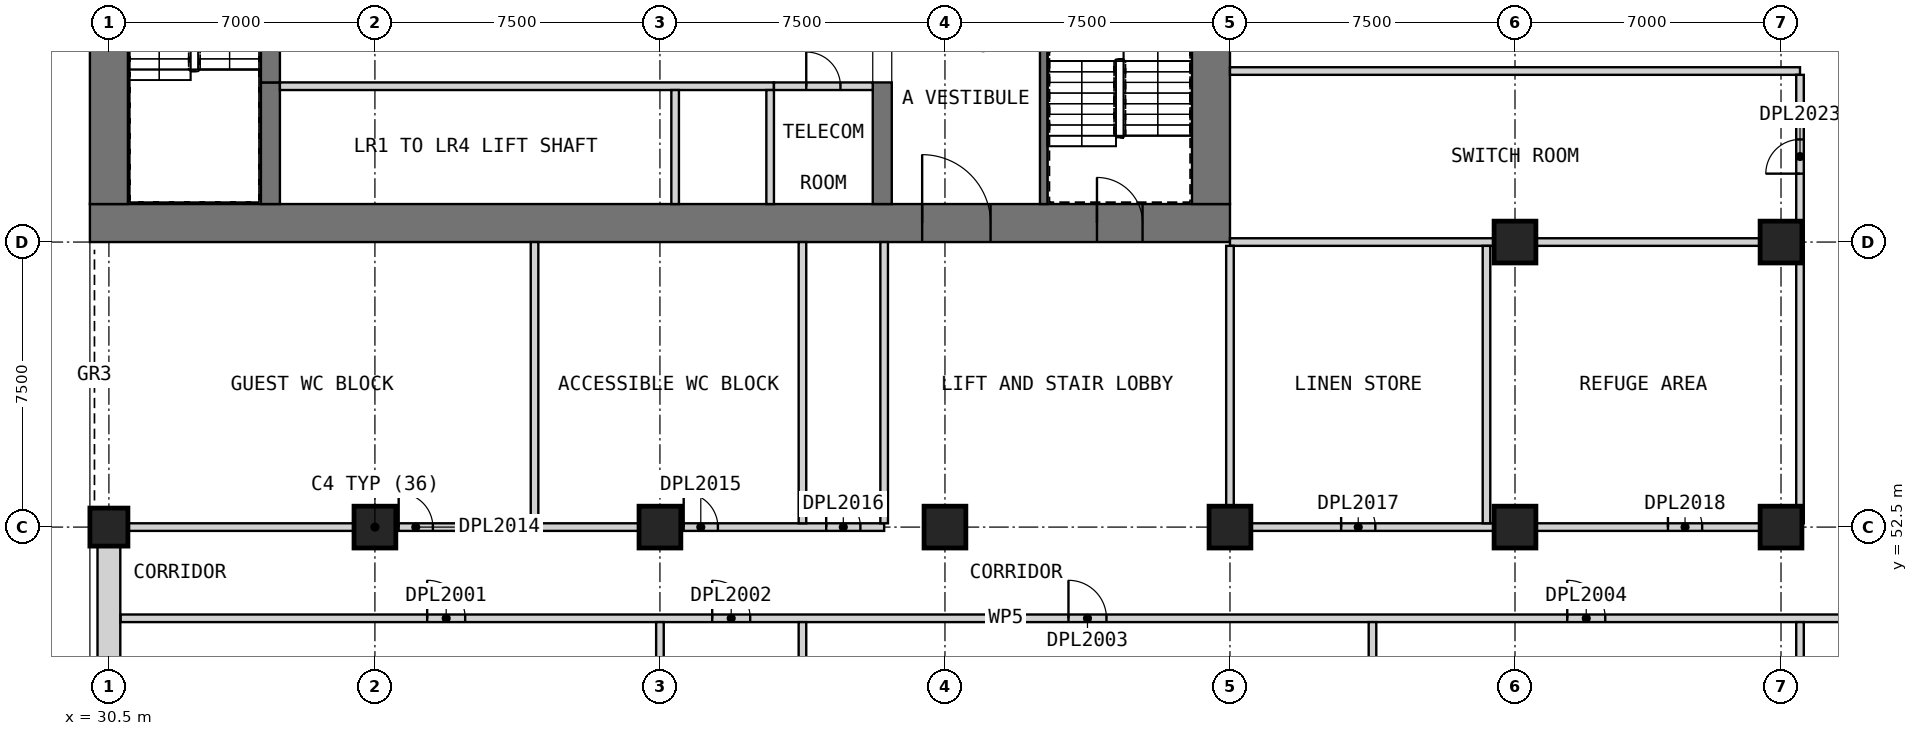
"""IFC4 building model, lengths in metres.
Left out: names, types, materials, properties, quantities, classifications, styles, units other than length and angle.
Written with IfcOpenShell. Run it as: python <this file> out.ifc"""

import sys

from ifc_helpers import new_model, si_unit, direction, frame, frame_2d, origin, origin_2d, place, context, subcontext, project, spatial, rectangle, extrude, element, fill, save


model = new_model("IFC4")
c1 = context("Model", 3, precision=1e-05, world=origin(), true_north=direction((0.0, 1.0)))
c2 = subcontext(c1, "Body", "Model", "MODEL_VIEW")
j1 = project(units=[si_unit("LENGTHUNIT", "METRE"), si_unit("PLANEANGLEUNIT", "RADIAN")], contexts=[c1])
p1 = place(None, origin())
s1 = spatial("IfcSite", under=j1, at=p1, CompositionType="ELEMENT")
p2 = place(p1, origin())
s2 = spatial("IfcBuilding", under=s1, at=p2, CompositionType="ELEMENT")
p3 = place(p2, frame((0.0, 0.0, 118.7)))
s3 = spatial("IfcBuildingStorey", under=s2, at=p3, CompositionType="ELEMENT", Elevation=118.7)
p4 = place(p3, frame((30.5, 52.5, 0.0), z_axis=(0.0, 0.0, 1.0), x_axis=(1.0, 0.0, 0.0)))
e1 = element("IfcColumn", 1, at=p4, inside=s3, PredefinedType="COLUMN", context=c2, shape_type="SweptSolid", body=[
    extrude(rectangle(XDim=1.0, YDim=1.0, at=origin_2d()), origin(), (0.0, 0.0, 1.0), 5.5),
])
for number, where, z_axis, x_axis in (
    (2, (37.5, 52.5, 0.0), (0.0, 0.0, 1.0), (1.0, 0.0, 0.0)),
    (3, (45.0, 52.5, 0.0), (0.0, 0.0, 1.0), (1.0, 0.0, 0.0)),
    (4, (52.5, 52.5, 0.0), (0.0, 0.0, 1.0), (1.0, 0.0, 0.0)),
    (5, (60.0, 52.5, 0.0), (0.0, 0.0, 1.0), (1.0, 0.0, 0.0)),
    (6, (67.5, 52.5, 0.0), (0.0, 0.0, 1.0), (1.0, 0.0, 0.0)),
    (7, (67.5, 60.0, 0.0), (0.0, 0.0, 1.0), (1.0, 0.0, 0.0)),
    (8, (74.5, 52.5, 0.0), (0.0, 0.0, 1.0), (1.0, 0.0, 0.0)),
    (9, (74.5, 60.0, 0.0), (0.0, 0.0, 1.0), (1.0, 0.0, 0.0)),
):
    element("IfcColumn", number, at=place(p3, frame(where, z_axis=z_axis, x_axis=x_axis)), inside=s3, PredefinedType="COLUMN", context=c2, shape_type="SweptSolid", body=[
        extrude(rectangle(XDim=1.1, YDim=1.1, at=origin_2d()), origin(), (0.0, 0.0, 1.0), 5.5),
    ])
p5 = place(p3, frame((30.0, 60.5, 0.0), z_axis=(0.0, 0.0, 1.0), x_axis=(1.0, 0.0, 0.0)))
e10 = element("IfcWall", 10, at=p5, inside=s3, PredefinedType="SHEAR", context=c2, shape_type="SweptSolid", body=[
    extrude(rectangle(XDim=30.0, YDim=1.0, at=frame_2d((15.0, 0.0))), origin(), (0.0, 0.0, 1.0), 5.5),
])
p6 = place(p5, frame((21.9, 0.0, 0.0)))
e11 = element("IfcOpeningElement", 11, at=p6, cuts=e10, PredefinedType="OPENING", context=c2, shape_type="SweptSolid", body=[
    extrude(rectangle(XDim=1.8, YDim=2.1, at=frame_2d((0.9, 1.05))), frame((0.0, 0.51, 0.0), z_axis=(0.0, -1.0, 0.0), x_axis=(1.0, 0.0, 0.0)), (0.0, 0.0, 1.0), 1.02),
])
p7 = place(p5, frame((26.5, 0.0, 0.0)))
e12 = element("IfcOpeningElement", 12, at=p7, cuts=e10, PredefinedType="OPENING", context=c2, shape_type="SweptSolid", body=[
    extrude(rectangle(XDim=1.2, YDim=2.1, at=frame_2d((0.6, 1.05))), frame((0.0, 0.51, 0.0), z_axis=(0.0, -1.0, 0.0), x_axis=(1.0, 0.0, 0.0)), (0.0, 0.0, 1.0), 1.02),
])
p8 = place(p3, frame((30.5, 61.0, 0.0), z_axis=(0.0, 0.0, 1.0), x_axis=(0.0, 1.0, 0.0)))
e13 = element("IfcWall", 13, at=p8, inside=s3, PredefinedType="SHEAR", context=c2, shape_type="SweptSolid", body=[
    extrude(rectangle(XDim=20.5, YDim=1.0, at=frame_2d((10.25, 0.0))), origin(), (0.0, 0.0, 1.0), 5.5),
])
p9 = place(p3, frame((59.5, 61.0, 0.0), z_axis=(0.0, 0.0, 1.0), x_axis=(0.0, 1.0, 0.0)))
e14 = element("IfcWall", 14, at=p9, inside=s3, PredefinedType="SHEAR", context=c2, shape_type="SweptSolid", body=[
    extrude(rectangle(XDim=20.5, YDim=1.0, at=frame_2d((10.25, 0.0))), origin(), (0.0, 0.0, 1.0), 5.5),
])
p10 = place(p9, frame((14.5, 0.0, 0.0)))
e15 = element("IfcOpeningElement", 15, at=p10, cuts=e14, PredefinedType="OPENING", context=c2, shape_type="SweptSolid", body=[
    extrude(rectangle(XDim=1.8, YDim=2.1, at=frame_2d((0.9, 1.05))), frame((0.0, 0.51, 0.0), z_axis=(0.0, -1.0, 0.0), x_axis=(1.0, 0.0, 0.0)), (0.0, 0.0, 1.0), 1.02),
])
for number, where, z_axis, x_axis in (
    (16, (34.75, 61.0, 0.0), (0.0, 0.0, 1.0), (0.0, 1.0, 0.0)),
    (17, (50.85, 61.0, 0.0), (0.0, 0.0, 1.0), (0.0, 1.0, 0.0)),
):
    element("IfcWall", number, at=place(p3, frame(where, z_axis=z_axis, x_axis=x_axis)), inside=s3, PredefinedType="SHEAR", context=c2, shape_type="SweptSolid", body=[
        extrude(rectangle(XDim=3.2, YDim=0.5, at=frame_2d((1.6, 0.0))), origin(), (0.0, 0.0, 1.0), 5.5),
    ])
p11 = place(p2, frame((0.0, 0.0, 34.0)))
s4 = spatial("IfcBuildingStorey", under=s2, at=p11, CompositionType="ELEMENT", Elevation=34.0)
p12 = place(p11, frame((29.7, 61.05, 0.0), z_axis=(0.0, 0.0, 1.0), x_axis=(0.0, 1.0, 0.0)))
e18 = element("IfcWall", 18, at=p12, inside=s4, PredefinedType="SOLIDWALL", context=c2, shape_type="SweptSolid", body=[
    extrude(rectangle(XDim=0.9, YDim=0.6, at=frame_2d((0.45, 0.0))), origin(), (0.0, 0.0, 1.0), 286.2),
])
p13 = place(p3, frame((30.5, 52.0, 0.0), z_axis=(0.0, 0.0, 1.0), x_axis=(0.0, -1.0, 0.0)))
e19 = element("IfcWall", 19, at=p13, inside=s3, PredefinedType="ELEMENTEDWALL", context=c2, shape_type="SweptSolid", body=[
    extrude(rectangle(XDim=6.0, YDim=0.6, at=frame_2d((3.0, 0.0))), origin(), (0.0, 0.0, 1.0), 4.75),
])
p14 = place(p3, frame((35.0, 64.1, 0.0), z_axis=(0.0, 0.0, 1.0), x_axis=(1.0, 0.0, 0.0)))
e20 = element("IfcWall", 20, at=p14, inside=s3, PredefinedType="SOLIDWALL", context=c2, shape_type="SweptSolid", body=[
    extrude(rectangle(XDim=13.0, YDim=0.2, at=frame_2d((6.5, 0.0))), origin(), (0.0, 0.0, 1.0), 5.5),
])
for number, where, z_axis, x_axis in (
    (21, (45.4, 61.0, 0.0), (0.0, 0.0, 1.0), (0.0, 1.0, 0.0)),
    (22, (47.9, 61.0, 0.0), (0.0, 0.0, 1.0), (0.0, 1.0, 0.0)),
):
    element("IfcWall", number, at=place(p3, frame(where, z_axis=z_axis, x_axis=x_axis)), inside=s3, PredefinedType="SOLIDWALL", context=c2, shape_type="SweptSolid", body=[
        extrude(rectangle(XDim=3.0, YDim=0.2, at=frame_2d((1.5, 0.0))), origin(), (0.0, 0.0, 1.0), 5.5),
    ])
p15 = place(p3, frame((48.0, 64.1, 0.0), z_axis=(0.0, 0.0, 1.0), x_axis=(1.0, 0.0, 0.0)))
e23 = element("IfcWall", 23, at=p15, inside=s3, PredefinedType="PARTITIONING", context=c2, shape_type="SweptSolid", body=[
    extrude(rectangle(XDim=2.6, YDim=0.2, at=frame_2d((1.3, 0.0))), origin(), (0.0, 0.0, 1.0), 5.2),
])
p16 = place(p15, frame((0.85, 0.0, 0.0)))
e24 = element("IfcOpeningElement", 24, at=p16, cuts=e23, PredefinedType="OPENING", context=c2, shape_type="SweptSolid", body=[
    extrude(rectangle(XDim=0.9, YDim=2.1, at=frame_2d((0.45, 1.05))), frame((0.0, 0.11, 0.0), z_axis=(0.0, -1.0, 0.0), x_axis=(1.0, 0.0, 0.0)), (0.0, 0.0, 1.0), 0.22),
])
p17 = place(p3, frame((34.75, 64.2, 0.0), z_axis=(0.0, 0.0, 1.0), x_axis=(0.0, 1.0, 0.0)))
e25 = element("IfcWall", 25, at=p17, inside=s3, PredefinedType="SOLIDWALL", context=c2, shape_type="SweptSolid", body=[
    extrude(rectangle(XDim=3.85, YDim=0.5, at=frame_2d((1.925, 0.0))), origin(), (0.0, 0.0, 1.0), 4.3),
])
p18 = place(p17, frame((2.3, 0.0, 0.0)))
e26 = element("IfcOpeningElement", 26, at=p18, cuts=e25, PredefinedType="OPENING", context=c2, shape_type="SweptSolid", body=[
    extrude(rectangle(XDim=1.2, YDim=2.1, at=frame_2d((0.6, 1.05))), frame((0.0, 0.26, 0.0), z_axis=(0.0, -1.0, 0.0), x_axis=(1.0, 0.0, 0.0)), (0.0, 0.0, 1.0), 0.52),
])
p19 = place(p3, frame((55.1, 61.0, 0.0), z_axis=(0.0, 0.0, 1.0), x_axis=(0.0, 1.0, 0.0)))
e27 = element("IfcWall", 27, at=p19, inside=s3, PredefinedType="SOLIDWALL", context=c2, shape_type="SweptSolid", body=[
    extrude(rectangle(XDim=7.6, YDim=0.2, at=frame_2d((3.8, 0.0))), origin(), (0.0, 0.0, 1.0), 5.2),
])
p20 = place(p3, frame((30.81, 50.1, 0.0), z_axis=(0.0, 0.0, 1.0), x_axis=(1.0, 0.0, 0.0)))
e28 = element("IfcWall", 28, at=p20, inside=s3, PredefinedType="PARTITIONING", context=c2, shape_type="SweptSolid", body=[
    extrude(rectangle(XDim=46.59, YDim=0.2, at=frame_2d((23.295, 0.0))), origin(), (0.0, 0.0, 1.0), 5.2),
])
p21 = place(p20, frame((8.065, 0.0, 0.0)))
e29 = element("IfcOpeningElement", 29, at=p21, cuts=e28, PredefinedType="OPENING", context=c2, shape_type="SweptSolid", body=[
    extrude(rectangle(XDim=1.0, YDim=2.1, at=frame_2d((0.5, 1.05))), frame((0.0, 0.11, 0.0), z_axis=(0.0, -1.0, 0.0), x_axis=(1.0, 0.0, 0.0)), (0.0, 0.0, 1.0), 0.22),
])
p22 = place(p20, frame((15.565, 0.0, 0.0)))
e30 = element("IfcOpeningElement", 30, at=p22, cuts=e28, PredefinedType="OPENING", context=c2, shape_type="SweptSolid", body=[
    extrude(rectangle(XDim=1.0, YDim=2.1, at=frame_2d((0.5, 1.05))), frame((0.0, 0.11, 0.0), z_axis=(0.0, -1.0, 0.0), x_axis=(1.0, 0.0, 0.0)), (0.0, 0.0, 1.0), 0.22),
])
p23 = place(p20, frame((24.94, 0.0, 0.0)))
e31 = element("IfcOpeningElement", 31, at=p23, cuts=e28, PredefinedType="OPENING", context=c2, shape_type="SweptSolid", body=[
    extrude(rectangle(XDim=1.0, YDim=2.1, at=frame_2d((0.5, 1.05))), frame((0.0, 0.11, 0.0), z_axis=(0.0, -1.0, 0.0), x_axis=(1.0, 0.0, 0.0)), (0.0, 0.0, 1.0), 0.22),
])
p24 = place(p20, frame((38.065, 0.0, 0.0)))
e32 = element("IfcOpeningElement", 32, at=p24, cuts=e28, PredefinedType="OPENING", context=c2, shape_type="SweptSolid", body=[
    extrude(rectangle(XDim=1.0, YDim=2.1, at=frame_2d((0.5, 1.05))), frame((0.0, 0.11, 0.0), z_axis=(0.0, -1.0, 0.0), x_axis=(1.0, 0.0, 0.0)), (0.0, 0.0, 1.0), 0.22),
])
p25 = place(p3, frame((30.0, 52.5, 0.0), z_axis=(0.0, 0.0, 1.0), x_axis=(1.0, 0.0, 0.0)))
e33 = element("IfcWall", 33, at=p25, inside=s3, PredefinedType="PARTITIONING", context=c2, shape_type="SweptSolid", body=[
    extrude(rectangle(XDim=20.9, YDim=0.2, at=frame_2d((10.45, 0.0))), origin(), (0.0, 0.0, 1.0), 5.2),
])
p26 = place(p25, frame((8.125, 0.0, 0.0)))
e34 = element("IfcOpeningElement", 34, at=p26, cuts=e33, PredefinedType="OPENING", context=c2, shape_type="SweptSolid", body=[
    extrude(rectangle(XDim=0.9, YDim=2.1, at=frame_2d((0.45, 1.05))), frame((0.0, 0.11, 0.0), z_axis=(0.0, -1.0, 0.0), x_axis=(1.0, 0.0, 0.0)), (0.0, 0.0, 1.0), 0.22),
])
p27 = place(p25, frame((15.625, 0.0, 0.0)))
e35 = element("IfcOpeningElement", 35, at=p27, cuts=e33, PredefinedType="OPENING", context=c2, shape_type="SweptSolid", body=[
    extrude(rectangle(XDim=0.9, YDim=2.1, at=frame_2d((0.45, 1.05))), frame((0.0, 0.11, 0.0), z_axis=(0.0, -1.0, 0.0), x_axis=(1.0, 0.0, 0.0)), (0.0, 0.0, 1.0), 0.22),
])
p28 = place(p25, frame((19.375, 0.0, 0.0)))
e36 = element("IfcOpeningElement", 36, at=p28, cuts=e33, PredefinedType="OPENING", context=c2, shape_type="SweptSolid", body=[
    extrude(rectangle(XDim=0.9, YDim=2.1, at=frame_2d((0.45, 1.05))), frame((0.0, 0.11, 0.0), z_axis=(0.0, -1.0, 0.0), x_axis=(1.0, 0.0, 0.0)), (0.0, 0.0, 1.0), 0.22),
])
p29 = place(p3, frame((60.0, 52.5, 0.0), z_axis=(0.0, 0.0, 1.0), x_axis=(1.0, 0.0, 0.0)))
e37 = element("IfcWall", 37, at=p29, inside=s3, PredefinedType="PARTITIONING", context=c2, shape_type="SweptSolid", body=[
    extrude(rectangle(XDim=15.0, YDim=0.2, at=frame_2d((7.5, 0.0))), origin(), (0.0, 0.0, 1.0), 5.2),
])
p30 = place(p29, frame((2.925, 0.0, 0.0)))
e38 = element("IfcOpeningElement", 38, at=p30, cuts=e37, PredefinedType="OPENING", context=c2, shape_type="SweptSolid", body=[
    extrude(rectangle(XDim=0.9, YDim=2.1, at=frame_2d((0.45, 1.05))), frame((0.0, 0.11, 0.0), z_axis=(0.0, -1.0, 0.0), x_axis=(1.0, 0.0, 0.0)), (0.0, 0.0, 1.0), 0.22),
])
p31 = place(p29, frame((11.525, 0.0, 0.0)))
e39 = element("IfcOpeningElement", 39, at=p31, cuts=e37, PredefinedType="OPENING", context=c2, shape_type="SweptSolid", body=[
    extrude(rectangle(XDim=0.9, YDim=2.1, at=frame_2d((0.45, 1.05))), frame((0.0, 0.11, 0.0), z_axis=(0.0, -1.0, 0.0), x_axis=(1.0, 0.0, 0.0)), (0.0, 0.0, 1.0), 0.22),
])
p32 = place(p3, frame((60.0, 60.0, 0.0), z_axis=(0.0, 0.0, 1.0), x_axis=(1.0, 0.0, 0.0)))
e40 = element("IfcWall", 40, at=p32, inside=s3, PredefinedType="PARTITIONING", context=c2, shape_type="SweptSolid", body=[
    extrude(rectangle(XDim=14.9, YDim=0.2, at=frame_2d((7.45, 0.0))), origin(), (0.0, 0.0, 1.0), 5.2),
])
p33 = place(p3, frame((60.0, 64.5, 0.0), z_axis=(0.0, 0.0, 1.0), x_axis=(1.0, 0.0, 0.0)))
e41 = element("IfcWall", 41, at=p33, inside=s3, PredefinedType="PARTITIONING", context=c2, shape_type="SweptSolid", body=[
    extrude(rectangle(XDim=15.0, YDim=0.2, at=frame_2d((7.5, 0.0))), origin(), (0.0, 0.0, 1.0), 5.2),
])
p34 = place(p3, frame((41.7, 52.6, 0.0), z_axis=(0.0, 0.0, 1.0), x_axis=(0.0, 1.0, 0.0)))
e42 = element("IfcWall", 42, at=p34, inside=s3, PredefinedType="PARTITIONING", context=c2, shape_type="SweptSolid", body=[
    extrude(rectangle(XDim=7.4, YDim=0.2, at=frame_2d((3.7, 0.0))), origin(), (0.0, 0.0, 1.0), 5.2),
])
p35 = place(p3, frame((45.0, 37.5, 0.0), z_axis=(0.0, 0.0, 1.0), x_axis=(0.0, 1.0, 0.0)))
e43 = element("IfcWall", 43, at=p35, inside=s3, PredefinedType="PARTITIONING", context=c2, shape_type="SweptSolid", body=[
    extrude(rectangle(XDim=12.5, YDim=0.2, at=frame_2d((6.25, 0.0))), origin(), (0.0, 0.0, 1.0), 5.2),
])
p36 = place(p3, frame((48.75, 38.31, 0.0), z_axis=(0.0, 0.0, 1.0), x_axis=(0.0, 1.0, 0.0)))
e44 = element("IfcWall", 44, at=p36, inside=s3, PredefinedType="PARTITIONING", context=c2, shape_type="SweptSolid", body=[
    extrude(rectangle(XDim=11.69, YDim=0.2, at=frame_2d((5.845, 0.0))), origin(), (0.0, 0.0, 1.0), 5.2),
])
for number, where, z_axis, x_axis in (
    (45, (48.75, 52.6, 0.0), (0.0, 0.0, 1.0), (0.0, 1.0, 0.0)),
    (46, (50.9, 52.6, 0.0), (0.0, 0.0, 1.0), (0.0, 1.0, 0.0)),
):
    element("IfcWall", number, at=place(p3, frame(where, z_axis=z_axis, x_axis=x_axis)), inside=s3, PredefinedType="PARTITIONING", context=c2, shape_type="SweptSolid", body=[
        extrude(rectangle(XDim=7.4, YDim=0.2, at=frame_2d((3.7, 0.0))), origin(), (0.0, 0.0, 1.0), 5.2),
    ])
p37 = place(p3, frame((60.0, 52.6, 0.0), z_axis=(0.0, 0.0, 1.0), x_axis=(0.0, 1.0, 0.0)))
e47 = element("IfcWall", 47, at=p37, inside=s3, PredefinedType="PARTITIONING", context=c2, shape_type="SweptSolid", body=[
    extrude(rectangle(XDim=7.3, YDim=0.2, at=frame_2d((3.65, 0.0))), origin(), (0.0, 0.0, 1.0), 5.2),
])
p38 = place(p3, frame((63.75, 38.31, 0.0), z_axis=(0.0, 0.0, 1.0), x_axis=(0.0, 1.0, 0.0)))
e48 = element("IfcWall", 48, at=p38, inside=s3, PredefinedType="PARTITIONING", context=c2, shape_type="SweptSolid", body=[
    extrude(rectangle(XDim=11.69, YDim=0.2, at=frame_2d((5.845, 0.0))), origin(), (0.0, 0.0, 1.0), 5.2),
])
p39 = place(p3, frame((66.75, 52.6, 0.0), z_axis=(0.0, 0.0, 1.0), x_axis=(0.0, 1.0, 0.0)))
e49 = element("IfcWall", 49, at=p39, inside=s3, PredefinedType="PARTITIONING", context=c2, shape_type="SweptSolid", body=[
    extrude(rectangle(XDim=7.3, YDim=0.2, at=frame_2d((3.65, 0.0))), origin(), (0.0, 0.0, 1.0), 5.2),
])
p40 = place(p3, frame((75.0, 38.31, 0.0), z_axis=(0.0, 0.0, 1.0), x_axis=(0.0, 1.0, 0.0)))
e50 = element("IfcWall", 50, at=p40, inside=s3, PredefinedType="PARTITIONING", context=c2, shape_type="SweptSolid", body=[
    extrude(rectangle(XDim=11.69, YDim=0.2, at=frame_2d((5.845, 0.0))), origin(), (0.0, 0.0, 1.0), 5.2),
])
p41 = place(p3, frame((75.0, 52.6, 0.0), z_axis=(0.0, 0.0, 1.0), x_axis=(0.0, 1.0, 0.0)))
e51 = element("IfcWall", 51, at=p41, inside=s3, PredefinedType="PARTITIONING", context=c2, shape_type="SweptSolid", body=[
    extrude(rectangle(XDim=11.8, YDim=0.2, at=frame_2d((5.9, 0.0))), origin(), (0.0, 0.0, 1.0), 5.2),
])
p42 = place(p41, frame((9.2, 0.0, 0.0)))
e52 = element("IfcOpeningElement", 52, at=p42, cuts=e51, PredefinedType="OPENING", context=c2, shape_type="SweptSolid", body=[
    extrude(rectangle(XDim=0.9, YDim=2.1, at=frame_2d((0.45, 1.05))), frame((0.0, 0.11, 0.0), z_axis=(0.0, -1.0, 0.0), x_axis=(1.0, 0.0, 0.0)), (0.0, 0.0, 1.0), 0.22),
])
p43 = place(p16, origin())
e53 = element("IfcDoor", 53, at=p43, inside=s3, OperationType="SINGLE_SWING_LEFT", PredefinedType="DOOR", context=c2, shape_type="SweptSolid", body=[
    extrude(rectangle(XDim=0.9, YDim=2.1, at=frame_2d((0.45, 1.05))), frame((0.0, 0.025, 0.0), z_axis=(0.0, -1.0, 0.0), x_axis=(1.0, 0.0, 0.0)), (0.0, 0.0, 1.0), 0.05),
])
fill(e24, e53)
p44 = place(p6, origin())
e54 = element("IfcDoor", 54, at=p44, inside=s3, OperationType="DOUBLE_DOOR_SINGLE_SWING", PredefinedType="DOOR", context=c2, shape_type="SweptSolid", body=[
    extrude(rectangle(XDim=1.8, YDim=2.1, at=frame_2d((0.9, 1.05))), frame((0.0, 0.025, 0.0), z_axis=(0.0, -1.0, 0.0), x_axis=(1.0, 0.0, 0.0)), (0.0, 0.0, 1.0), 0.05),
])
fill(e11, e54)
p45 = place(p7, origin())
e55 = element("IfcDoor", 55, at=p45, inside=s3, OperationType="SINGLE_SWING_LEFT", PredefinedType="DOOR", context=c2, shape_type="SweptSolid", body=[
    extrude(rectangle(XDim=1.2, YDim=2.1, at=frame_2d((0.6, 1.05))), frame((0.0, 0.025, 0.0), z_axis=(0.0, -1.0, 0.0), x_axis=(1.0, 0.0, 0.0)), (0.0, 0.0, 1.0), 0.05),
])
fill(e12, e55)
p46 = place(p21, origin())
e56 = element("IfcDoor", 56, at=p46, inside=s3, OperationType="SINGLE_SWING_RIGHT", PredefinedType="DOOR", context=c2, shape_type="SweptSolid", body=[
    extrude(rectangle(XDim=1.0, YDim=2.1, at=frame_2d((0.5, 1.05))), frame((0.0, 0.025, 0.0), z_axis=(0.0, -1.0, 0.0), x_axis=(1.0, 0.0, 0.0)), (0.0, 0.0, 1.0), 0.05),
])
fill(e29, e56)
p47 = place(p22, origin())
e57 = element("IfcDoor", 57, at=p47, inside=s3, OperationType="SINGLE_SWING_RIGHT", PredefinedType="DOOR", context=c2, shape_type="SweptSolid", body=[
    extrude(rectangle(XDim=1.0, YDim=2.1, at=frame_2d((0.5, 1.05))), frame((0.0, 0.025, 0.0), z_axis=(0.0, -1.0, 0.0), x_axis=(1.0, 0.0, 0.0)), (0.0, 0.0, 1.0), 0.05),
])
fill(e30, e57)
p48 = place(p23, origin())
e58 = element("IfcDoor", 58, at=p48, inside=s3, OperationType="SINGLE_SWING_RIGHT", PredefinedType="DOOR", context=c2, shape_type="SweptSolid", body=[
    extrude(rectangle(XDim=1.0, YDim=2.1, at=frame_2d((0.5, 1.05))), frame((0.0, 0.025, 0.0), z_axis=(0.0, -1.0, 0.0), x_axis=(1.0, 0.0, 0.0)), (0.0, 0.0, 1.0), 0.05),
])
fill(e31, e58)
p49 = place(p24, origin())
e59 = element("IfcDoor", 59, at=p49, inside=s3, OperationType="SINGLE_SWING_RIGHT", PredefinedType="DOOR", context=c2, shape_type="SweptSolid", body=[
    extrude(rectangle(XDim=1.0, YDim=2.1, at=frame_2d((0.5, 1.05))), frame((0.0, 0.025, 0.0), z_axis=(0.0, -1.0, 0.0), x_axis=(1.0, 0.0, 0.0)), (0.0, 0.0, 1.0), 0.05),
])
fill(e32, e59)
p50 = place(p26, origin())
e60 = element("IfcDoor", 60, at=p50, inside=s3, OperationType="SINGLE_SWING_RIGHT", PredefinedType="DOOR", context=c2, shape_type="SweptSolid", body=[
    extrude(rectangle(XDim=0.9, YDim=2.1, at=frame_2d((0.45, 1.05))), frame((0.0, 0.025, 0.0), z_axis=(0.0, -1.0, 0.0), x_axis=(1.0, 0.0, 0.0)), (0.0, 0.0, 1.0), 0.05),
])
fill(e34, e60)
p51 = place(p27, origin())
e61 = element("IfcDoor", 61, at=p51, inside=s3, OperationType="SINGLE_SWING_RIGHT", PredefinedType="DOOR", context=c2, shape_type="SweptSolid", body=[
    extrude(rectangle(XDim=0.9, YDim=2.1, at=frame_2d((0.45, 1.05))), frame((0.0, 0.025, 0.0), z_axis=(0.0, -1.0, 0.0), x_axis=(1.0, 0.0, 0.0)), (0.0, 0.0, 1.0), 0.05),
])
fill(e35, e61)
p52 = place(p28, origin())
e62 = element("IfcDoor", 62, at=p52, inside=s3, OperationType="SINGLE_SWING_LEFT", PredefinedType="DOOR", context=c2, shape_type="SweptSolid", body=[
    extrude(rectangle(XDim=0.9, YDim=2.1, at=frame_2d((0.45, 1.05))), frame((0.0, 0.025, 0.0), z_axis=(0.0, -1.0, 0.0), x_axis=(1.0, 0.0, 0.0)), (0.0, 0.0, 1.0), 0.05),
])
fill(e36, e62)
p53 = place(p30, origin())
e63 = element("IfcDoor", 63, at=p53, inside=s3, OperationType="SINGLE_SWING_LEFT", PredefinedType="DOOR", context=c2, shape_type="SweptSolid", body=[
    extrude(rectangle(XDim=0.9, YDim=2.1, at=frame_2d((0.45, 1.05))), frame((0.0, 0.025, 0.0), z_axis=(0.0, -1.0, 0.0), x_axis=(1.0, 0.0, 0.0)), (0.0, 0.0, 1.0), 0.05),
])
fill(e38, e63)
p54 = place(p31, origin())
e64 = element("IfcDoor", 64, at=p54, inside=s3, OperationType="SINGLE_SWING_LEFT", PredefinedType="DOOR", context=c2, shape_type="SweptSolid", body=[
    extrude(rectangle(XDim=0.9, YDim=2.1, at=frame_2d((0.45, 1.05))), frame((0.0, 0.025, 0.0), z_axis=(0.0, -1.0, 0.0), x_axis=(1.0, 0.0, 0.0)), (0.0, 0.0, 1.0), 0.05),
])
fill(e39, e64)
p55 = place(p42, origin())
e65 = element("IfcDoor", 65, at=p55, inside=s3, OperationType="SINGLE_SWING_LEFT", PredefinedType="DOOR", context=c2, shape_type="SweptSolid", body=[
    extrude(rectangle(XDim=0.9, YDim=2.1, at=frame_2d((0.45, 1.05))), frame((0.0, 0.025, 0.0), z_axis=(0.0, -1.0, 0.0), x_axis=(1.0, 0.0, 0.0)), (0.0, 0.0, 1.0), 0.05),
])
fill(e52, e65)
save(model, sys.argv[1])
